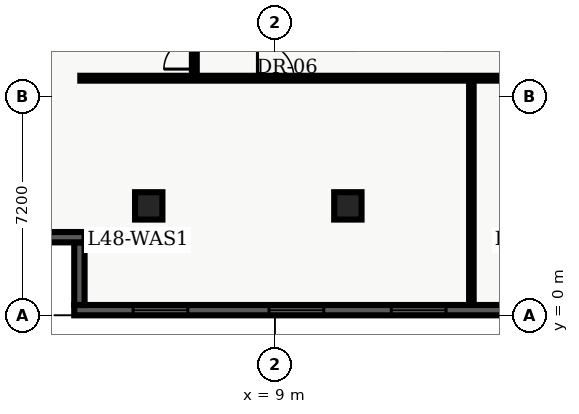
"""IFC4 building model, lengths in metres.
Left out: names, types, materials, properties, quantities, classifications, styles, units other than length and angle.
Written with IfcOpenShell. Run it as: python <this file> out.ifc"""

import sys

from ifc_helpers import new_model, entity, si_unit, converted_unit, direction, frame, origin_with_axes, origin_2d_with_axis, place, context, subcontext, project, spatial, polyline, rectangle, outline, extrude, element, fill, save


model = new_model("IFC4")
c1 = context("Model", 3, precision=1e-05, world=origin_with_axes(), true_north=direction((0.0, 1.0)))
c2 = subcontext(c1, "Body", "Model", "MODEL_VIEW")
j1 = project(units=[si_unit("LENGTHUNIT", "METRE"), converted_unit("PLANEANGLEUNIT", "DEGREE", entity("IfcPlaneAngleMeasure", 0.017), si_unit("PLANEANGLEUNIT", "RADIAN"), dimensions=[0, 0, 0, 0, 0, 0, 0])], contexts=[c1])
p1 = place(None, origin_with_axes())
s1 = spatial("IfcSite", under=j1, at=p1, CompositionType="ELEMENT")
p2 = place(p1, origin_with_axes())
s2 = spatial("IfcBuilding", under=s1, at=p2, CompositionType="ELEMENT")
p3 = place(p2, frame((0.0, 0.0, 196.5), z_axis=(0.0, 0.0, 1.0), x_axis=(1.0, 0.0, 0.0)))
s3 = spatial("IfcBuildingStorey", under=s2, at=p3, CompositionType="ELEMENT", Elevation=196.5)
for number, where, z_axis, x_axis in (
    (1, (11.4, 3.6, 0.0), (0.0, 0.0, 1.0), (1.0, 0.0, 0.0)),
    (2, (4.85, 3.6, 0.0), (0.0, 0.0, 1.0), (1.0, 0.0, 0.0)),
):
    element("IfcColumn", number, at=place(p3, frame(where, z_axis=z_axis, x_axis=x_axis)), inside=s3, PredefinedType="COLUMN", context=c2, shape_type="SweptSolid", body=[
        extrude(rectangle(XDim=0.9, YDim=0.9, at=origin_2d_with_axis()), origin_with_axes(), (0.0, 0.0, 1.0), 3.9),
    ])
p4 = place(p3, frame((2.6, 7.8, 0.0), z_axis=(0.0, 0.0, 1.0), x_axis=(1.0, 0.0, 0.0)))
e3 = element("IfcWall", 3, at=p4, inside=s3, PredefinedType="PARTITIONING", context=c2, shape_type="SweptSolid", body=[
    extrude(outline(polyline([(0.0, -0.08), (18.55, -0.08), (18.55, 0.08), (0.0, 0.08), (0.0, -0.08)])), origin_with_axes(), (0.0, 0.0, 1.0), 2.7),
])
p5 = place(p4, frame((6.426, 0.0, 0.0), z_axis=(0.0, 0.0, 1.0), x_axis=(1.0, 0.0, 0.0)))
e4 = element("IfcOpeningElement", 4, at=p5, cuts=e3, PredefinedType="OPENING", context=c2, shape_type="SweptSolid", body=[
    extrude(rectangle(XDim=1.2, YDim=0.18, at=origin_2d_with_axis()), origin_with_axes(), (0.0, 0.0, 1.0), 2.2),
])
p6 = place(p4, frame((15.681, 0.0, 0.0), z_axis=(0.0, 0.0, 1.0), x_axis=(1.0, 0.0, 0.0)))
e5 = element("IfcOpeningElement", 5, at=p6, cuts=e3, PredefinedType="OPENING", context=c2, shape_type="SweptSolid", body=[
    extrude(rectangle(XDim=1.0, YDim=0.18, at=origin_2d_with_axis()), origin_with_axes(), (0.0, 0.0, 1.0), 2.15),
])
p7 = place(p3, frame((6.35, 7.8, 0.0), z_axis=(0.0, 0.0, 1.0), x_axis=(0.0, 1.0, 0.0)))
e6 = element("IfcWall", 6, at=p7, inside=s3, PredefinedType="PARTITIONING", context=c2, shape_type="SweptSolid", body=[
    extrude(outline(polyline([(0.0, -0.08), (32.7, -0.08), (32.7, 0.08), (0.0, 0.08), (0.0, -0.08)])), origin_with_axes(), (0.0, 0.0, 1.0), 2.7),
])
p8 = place(p7, frame((0.8, 0.0, 0.0), z_axis=(0.0, 0.0, 1.0), x_axis=(1.0, 0.0, 0.0)))
e7 = element("IfcOpeningElement", 7, at=p8, cuts=e6, PredefinedType="OPENING", context=c2, shape_type="SweptSolid", body=[
    extrude(rectangle(XDim=1.0, YDim=0.18, at=origin_2d_with_axis()), origin_with_axes(), (0.0, 0.0, 1.0), 2.15),
])
p9 = place(p7, frame((6.971, 0.0, 0.0), z_axis=(0.0, 0.0, 1.0), x_axis=(1.0, 0.0, 0.0)))
e8 = element("IfcOpeningElement", 8, at=p9, cuts=e6, PredefinedType="OPENING", context=c2, shape_type="SweptSolid", body=[
    extrude(rectangle(XDim=1.0, YDim=0.18, at=origin_2d_with_axis()), origin_with_axes(), (0.0, 0.0, 1.0), 2.15),
])
p10 = place(p7, frame((12.598, 0.0, 0.0), z_axis=(0.0, 0.0, 1.0), x_axis=(1.0, 0.0, 0.0)))
e9 = element("IfcOpeningElement", 9, at=p10, cuts=e6, PredefinedType="OPENING", context=c2, shape_type="SweptSolid", body=[
    extrude(rectangle(XDim=1.0, YDim=0.18, at=origin_2d_with_axis()), origin_with_axes(), (0.0, 0.0, 1.0), 2.15),
])
p11 = place(p7, frame((19.386, 0.0, 0.0), z_axis=(0.0, 0.0, 1.0), x_axis=(1.0, 0.0, 0.0)))
e10 = element("IfcOpeningElement", 10, at=p11, cuts=e6, PredefinedType="OPENING", context=c2, shape_type="SweptSolid", body=[
    extrude(rectangle(XDim=1.0, YDim=0.18, at=origin_2d_with_axis()), origin_with_axes(), (0.0, 0.0, 1.0), 2.15),
])
p12 = place(p7, frame((27.82, 0.0, 0.0), z_axis=(0.0, 0.0, 1.0), x_axis=(1.0, 0.0, 0.0)))
e11 = element("IfcOpeningElement", 11, at=p12, cuts=e6, PredefinedType="OPENING", context=c2, shape_type="SweptSolid", body=[
    extrude(rectangle(XDim=1.0, YDim=0.18, at=origin_2d_with_axis()), origin_with_axes(), (0.0, 0.0, 1.0), 2.15),
])
p13 = place(p3, frame((15.463, 0.335, 0.0), z_axis=(0.0, 0.0, 1.0), x_axis=(0.0, 1.0, 0.0)))
e12 = element("IfcWall", 12, at=p13, inside=s3, PredefinedType="PARTITIONING", context=c2, shape_type="SweptSolid", body=[
    extrude(outline(polyline([(0.0, -0.075), (7.365, -0.075), (7.365, 0.075), (0.0, 0.075), (0.0, -0.075)])), origin_with_axes(), (0.0, 0.0, 1.0), 2.7),
])
p14 = place(p3, frame((57.26, 0.17, 0.0), z_axis=(0.0, 0.0, 1.0), x_axis=(-1.0, 0.0, 0.0)))
e13 = element("IfcWall", 13, at=p14, inside=s3, PredefinedType="SOLIDWALL", context=c2, shape_type="SweptSolid", body=[
    extrude(outline(polyline([(0.0, -0.17), (54.86, -0.17), (54.86, 0.17), (0.0, 0.17), (0.0, -0.17)])), origin_with_axes(), (0.0, 0.0, 1.0), 3.66),
])
p15 = place(p14, frame((2.836, 0.0, 0.45), z_axis=(0.0, 0.0, 1.0), x_axis=(1.0, 0.0, 0.0)))
e14 = element("IfcOpeningElement", 14, at=p15, cuts=e13, PredefinedType="OPENING", context=c2, shape_type="SweptSolid", body=[
    extrude(rectangle(XDim=1.8, YDim=0.36, at=origin_2d_with_axis()), origin_with_axes(), (0.0, 0.0, 1.0), 2.1),
])
p16 = place(p14, frame((7.307, 0.0, 0.45), z_axis=(0.0, 0.0, 1.0), x_axis=(1.0, 0.0, 0.0)))
e15 = element("IfcOpeningElement", 15, at=p16, cuts=e13, PredefinedType="OPENING", context=c2, shape_type="SweptSolid", body=[
    extrude(rectangle(XDim=1.8, YDim=0.36, at=origin_2d_with_axis()), origin_with_axes(), (0.0, 0.0, 1.0), 2.1),
])
p17 = place(p14, frame((11.779, 0.0, 0.45), z_axis=(0.0, 0.0, 1.0), x_axis=(1.0, 0.0, 0.0)))
e16 = element("IfcOpeningElement", 16, at=p17, cuts=e13, PredefinedType="OPENING", context=c2, shape_type="SweptSolid", body=[
    extrude(rectangle(XDim=1.8, YDim=0.36, at=origin_2d_with_axis()), origin_with_axes(), (0.0, 0.0, 1.0), 2.1),
])
p18 = place(p14, frame((16.251, 0.0, 0.45), z_axis=(0.0, 0.0, 1.0), x_axis=(1.0, 0.0, 0.0)))
e17 = element("IfcOpeningElement", 17, at=p18, cuts=e13, PredefinedType="OPENING", context=c2, shape_type="SweptSolid", body=[
    extrude(rectangle(XDim=1.8, YDim=0.36, at=origin_2d_with_axis()), origin_with_axes(), (0.0, 0.0, 1.0), 2.1),
])
p19 = place(p14, frame((20.723, 0.0, 0.45), z_axis=(0.0, 0.0, 1.0), x_axis=(1.0, 0.0, 0.0)))
e18 = element("IfcOpeningElement", 18, at=p19, cuts=e13, PredefinedType="OPENING", context=c2, shape_type="SweptSolid", body=[
    extrude(rectangle(XDim=1.8, YDim=0.36, at=origin_2d_with_axis()), origin_with_axes(), (0.0, 0.0, 1.0), 2.1),
])
p20 = place(p14, frame((34.138, 0.0, 0.45), z_axis=(0.0, 0.0, 1.0), x_axis=(1.0, 0.0, 0.0)))
e19 = element("IfcOpeningElement", 19, at=p20, cuts=e13, PredefinedType="OPENING", context=c2, shape_type="SweptSolid", body=[
    extrude(rectangle(XDim=1.8, YDim=0.36, at=origin_2d_with_axis()), origin_with_axes(), (0.0, 0.0, 1.0), 2.1),
])
p21 = place(p14, frame((38.609, 0.0, 0.45), z_axis=(0.0, 0.0, 1.0), x_axis=(1.0, 0.0, 0.0)))
e20 = element("IfcOpeningElement", 20, at=p21, cuts=e13, PredefinedType="OPENING", context=c2, shape_type="SweptSolid", body=[
    extrude(rectangle(XDim=1.8, YDim=0.36, at=origin_2d_with_axis()), origin_with_axes(), (0.0, 0.0, 1.0), 2.1),
])
p22 = place(p14, frame((43.531, 0.0, 0.45), z_axis=(0.0, 0.0, 1.0), x_axis=(1.0, 0.0, 0.0)))
e21 = element("IfcOpeningElement", 21, at=p22, cuts=e13, PredefinedType="OPENING", context=c2, shape_type="SweptSolid", body=[
    extrude(rectangle(XDim=1.8, YDim=0.36, at=origin_2d_with_axis()), origin_with_axes(), (0.0, 0.0, 1.0), 2.1),
])
p23 = place(p14, frame((47.553, 0.0, 0.45), z_axis=(0.0, 0.0, 1.0), x_axis=(1.0, 0.0, 0.0)))
e22 = element("IfcOpeningElement", 22, at=p23, cuts=e13, PredefinedType="OPENING", context=c2, shape_type="SweptSolid", body=[
    extrude(rectangle(XDim=1.8, YDim=0.36, at=origin_2d_with_axis()), origin_with_axes(), (0.0, 0.0, 1.0), 2.1),
])
p24 = place(p14, frame((52.024, 0.0, 0.45), z_axis=(0.0, 0.0, 1.0), x_axis=(1.0, 0.0, 0.0)))
e23 = element("IfcOpeningElement", 23, at=p24, cuts=e13, PredefinedType="OPENING", context=c2, shape_type="SweptSolid", body=[
    extrude(rectangle(XDim=1.8, YDim=0.36, at=origin_2d_with_axis()), origin_with_axes(), (0.0, 0.0, 1.0), 2.1),
])
p25 = place(p3, frame((2.57, 0.34, 0.0), z_axis=(0.0, 0.0, 1.0), x_axis=(0.0, 1.0, 0.0)))
e24 = element("IfcWall", 24, at=p25, inside=s3, PredefinedType="SOLIDWALL", context=c2, shape_type="SweptSolid", body=[
    extrude(outline(polyline([(0.0, -0.17), (2.06, -0.17), (2.06, 0.17), (0.0, 0.17), (0.0, -0.17)])), origin_with_axes(), (0.0, 0.0, 1.0), 3.66),
])
p26 = place(p3, frame((2.74, 2.57, 0.0), z_axis=(0.0, 0.0, 1.0), x_axis=(-1.0, 0.0, 0.0)))
e25 = element("IfcWall", 25, at=p26, inside=s3, PredefinedType="SOLIDWALL", context=c2, shape_type="SweptSolid", body=[
    extrude(outline(polyline([(0.0, -0.17), (2.74, -0.17), (2.74, 0.17), (0.0, 0.17), (0.0, -0.17)])), origin_with_axes(), (0.0, 0.0, 1.0), 3.66),
])
p27 = place(p7, frame((0.8, 0.0, 0.0), z_axis=(0.0, 0.0, 1.0), x_axis=(1.0, 0.0, 0.0)))
e26 = element("IfcDoor", 26, at=p27, inside=s3, OperationType="SINGLE_SWING_LEFT", PredefinedType="DOOR", context=c2, shape_type="SweptSolid", body=[
    extrude(rectangle(XDim=1.0, YDim=0.09, at=origin_2d_with_axis()), origin_with_axes(), (0.0, 0.0, 1.0), 2.15),
])
fill(e7, e26)
p28 = place(p4, frame((6.426, 0.0, 0.0), z_axis=(0.0, 0.0, 1.0), x_axis=(1.0, 0.0, 0.0)))
e27 = element("IfcDoor", 27, at=p28, inside=s3, OperationType="SINGLE_SWING_LEFT", PredefinedType="DOOR", context=c2, shape_type="SweptSolid", body=[
    extrude(rectangle(XDim=1.2, YDim=0.09, at=origin_2d_with_axis()), origin_with_axes(), (0.0, 0.0, 1.0), 2.2),
])
fill(e4, e27)
p29 = place(p14, frame((43.531, 0.0, 0.45), z_axis=(0.0, 0.0, 1.0), x_axis=(1.0, 0.0, 0.0)))
e28 = element("IfcWindow", 28, at=p29, inside=s3, PredefinedType="WINDOW", context=c2, shape_type="SweptSolid", body=[
    extrude(rectangle(XDim=1.8, YDim=0.09, at=origin_2d_with_axis()), origin_with_axes(), (0.0, 0.0, 1.0), 2.1),
])
fill(e21, e28)
p30 = place(p14, frame((47.553, 0.0, 0.45), z_axis=(0.0, 0.0, 1.0), x_axis=(1.0, 0.0, 0.0)))
e29 = element("IfcWindow", 29, at=p30, inside=s3, PredefinedType="WINDOW", context=c2, shape_type="SweptSolid", body=[
    extrude(rectangle(XDim=1.8, YDim=0.09, at=origin_2d_with_axis()), origin_with_axes(), (0.0, 0.0, 1.0), 2.1),
])
fill(e22, e29)
p31 = place(p14, frame((52.024, 0.0, 0.45), z_axis=(0.0, 0.0, 1.0), x_axis=(1.0, 0.0, 0.0)))
e30 = element("IfcWindow", 30, at=p31, inside=s3, PredefinedType="WINDOW", context=c2, shape_type="SweptSolid", body=[
    extrude(rectangle(XDim=1.8, YDim=0.09, at=origin_2d_with_axis()), origin_with_axes(), (0.0, 0.0, 1.0), 2.1),
])
fill(e23, e30)
save(model, sys.argv[1])
